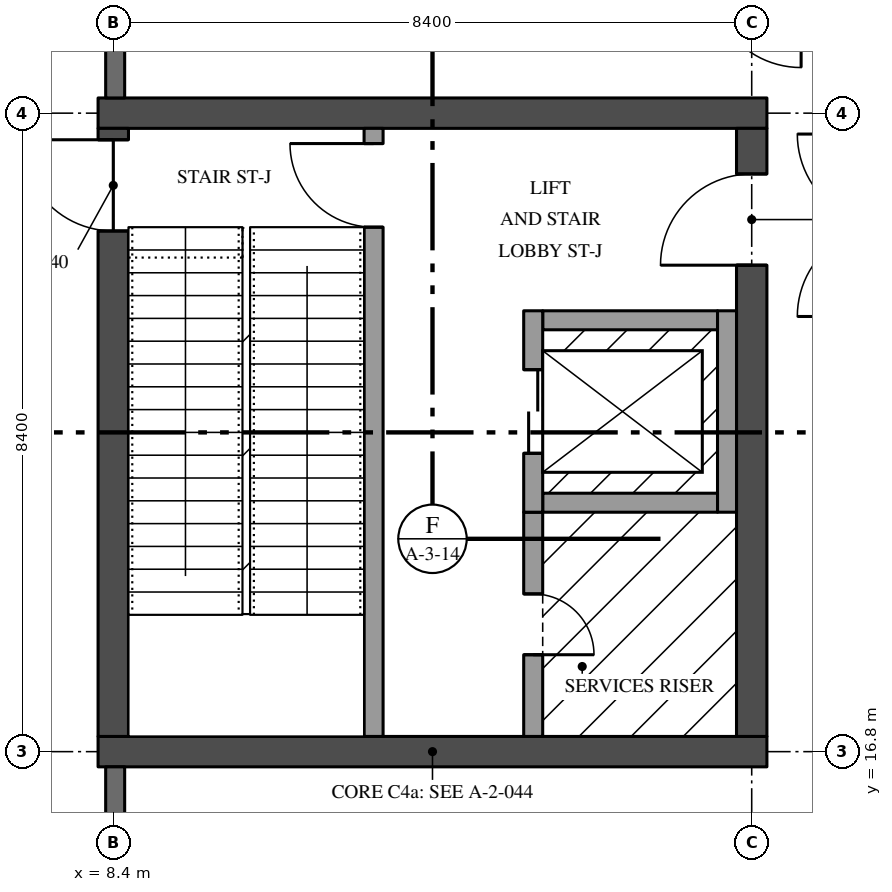
"""IFC4 building model, lengths in metres.
Left out: names, types, materials, properties, quantities, classifications, styles, units other than length and angle.
Written with IfcOpenShell. Run it as: python <this file> out.ifc"""

import sys

from ifc_helpers import new_model, si_unit, direction, frame, frame_2d, origin, place, context, subcontext, project, spatial, rectangle, extrude, element, fill, save


model = new_model("IFC4")
c1 = context("Model", 3, precision=1e-05, world=origin(), true_north=direction((0.0, 1.0)))
c2 = subcontext(c1, "Body", "Model", "MODEL_VIEW")
j1 = project(units=[si_unit("LENGTHUNIT", "METRE"), si_unit("PLANEANGLEUNIT", "RADIAN")], contexts=[c1])
p1 = place(None, origin())
s1 = spatial("IfcSite", under=j1, at=p1, CompositionType="ELEMENT")
p2 = place(p1, origin())
s2 = spatial("IfcBuilding", under=s1, at=p2, CompositionType="ELEMENT")
p3 = place(p2, origin())
s3 = spatial("IfcBuildingStorey", under=s2, at=p3, CompositionType="ELEMENT", Elevation=0.0)
for number, where, z_axis, x_axis in (
    (1, (8.2, 16.8, 0.0), (0.0, 0.0, 1.0), (1.0, 0.0, 0.0)),
    (2, (8.2, 25.2, 0.0), (0.0, 0.0, 1.0), (1.0, 0.0, 0.0)),
):
    element("IfcWall", number, at=place(p3, frame(where, z_axis=z_axis, x_axis=x_axis)), inside=s3, PredefinedType="SHEAR", context=c2, shape_type="SweptSolid", body=[
        extrude(rectangle(XDim=8.8, YDim=0.4, at=frame_2d((4.4, 0.0))), origin(), (0.0, 0.0, 1.0), 5.05),
    ])
p4 = place(p3, frame((8.4, 17.0, 0.0), z_axis=(0.0, 0.0, 1.0), x_axis=(0.0, 1.0, 0.0)))
e3 = element("IfcWall", 3, at=p4, inside=s3, PredefinedType="SHEAR", context=c2, shape_type="SweptSolid", body=[
    extrude(rectangle(XDim=8.0, YDim=0.4, at=frame_2d((4.0, 0.0))), origin(), (0.0, 0.0, 1.0), 5.05),
])
p5 = place(p4, frame((6.65, 0.0, 0.0)))
e4 = element("IfcOpeningElement", 4, at=p5, cuts=e3, PredefinedType="OPENING", context=c2, shape_type="SweptSolid", body=[
    extrude(rectangle(XDim=1.2, YDim=2.1, at=frame_2d((0.6, 1.05))), frame((0.0, 0.21, 0.0), z_axis=(0.0, -1.0, 0.0), x_axis=(1.0, 0.0, 0.0)), (0.0, 0.0, 1.0), 0.42),
])
p6 = place(p3, frame((16.8, 17.0, 0.0), z_axis=(0.0, 0.0, 1.0), x_axis=(0.0, 1.0, 0.0)))
e5 = element("IfcWall", 5, at=p6, inside=s3, PredefinedType="SHEAR", context=c2, shape_type="SweptSolid", body=[
    extrude(rectangle(XDim=8.0, YDim=0.4, at=frame_2d((4.0, 0.0))), origin(), (0.0, 0.0, 1.0), 5.05),
])
p7 = place(p6, frame((6.2, 0.0, 0.0)))
e6 = element("IfcOpeningElement", 6, at=p7, cuts=e5, PredefinedType="OPENING", context=c2, shape_type="SweptSolid", body=[
    extrude(rectangle(XDim=1.2, YDim=2.1, at=frame_2d((0.6, 1.05))), frame((0.0, 0.21, 0.0), z_axis=(0.0, -1.0, 0.0), x_axis=(1.0, 0.0, 0.0)), (0.0, 0.0, 1.0), 0.42),
])
p8 = place(p3, frame((11.825, 25.0, 0.0), z_axis=(0.0, 0.0, 1.0), x_axis=(0.0, -1.0, 0.0)))
e7 = element("IfcWall", 7, at=p8, inside=s3, PredefinedType="SOLIDWALL", context=c2, shape_type="SweptSolid", body=[
    extrude(rectangle(XDim=8.0, YDim=0.25, at=frame_2d((4.0, 0.0))), origin(), (0.0, 0.0, 1.0), 5.05),
])
p9 = place(p8, frame((0.2, 0.0, 0.0)))
e8 = element("IfcOpeningElement", 8, at=p9, cuts=e7, PredefinedType="OPENING", context=c2, shape_type="SweptSolid", body=[
    extrude(rectangle(XDim=1.1, YDim=2.1, at=frame_2d((0.55, 1.05))), frame((0.0, 0.135, 0.0), z_axis=(0.0, -1.0, 0.0), x_axis=(1.0, 0.0, 0.0)), (0.0, 0.0, 1.0), 0.27),
])
p10 = place(p3, frame((13.925, 19.95, 0.0), z_axis=(0.0, 0.0, 1.0), x_axis=(0.0, -1.0, 0.0)))
e9 = element("IfcWall", 9, at=p10, inside=s3, PredefinedType="SOLIDWALL", context=c2, shape_type="SweptSolid", body=[
    extrude(rectangle(XDim=2.95, YDim=0.25, at=frame_2d((1.475, 0.0))), origin(), (0.0, 0.0, 1.0), 5.05),
])
p11 = place(p10, frame((1.075, 0.0, 0.0)))
e10 = element("IfcOpeningElement", 10, at=p11, cuts=e9, PredefinedType="OPENING", context=c2, shape_type="SweptSolid", body=[
    extrude(rectangle(XDim=0.8, YDim=2.1, at=frame_2d((0.4, 1.05))), frame((0.0, 0.135, 0.0), z_axis=(0.0, -1.0, 0.0), x_axis=(1.0, 0.0, 0.0)), (0.0, 0.0, 1.0), 0.27),
])
p12 = place(p3, frame((16.475, 19.95, 0.0), z_axis=(0.0, 0.0, 1.0), x_axis=(0.0, 1.0, 0.0)))
e11 = element("IfcWall", 11, at=p12, inside=s3, PredefinedType="SOLIDWALL", context=c2, shape_type="SweptSolid", body=[
    extrude(rectangle(XDim=2.65, YDim=0.25, at=frame_2d((1.325, 0.0))), origin(), (0.0, 0.0, 1.0), 5.05),
])
for number, where, z_axis, x_axis in (
    (12, (14.05, 22.475, 0.0), (0.0, 0.0, 1.0), (1.0, 0.0, 0.0)),
    (13, (14.05, 20.075, 0.0), (0.0, 0.0, 1.0), (1.0, 0.0, 0.0)),
):
    element("IfcWall", number, at=place(p3, frame(where, z_axis=z_axis, x_axis=x_axis)), inside=s3, PredefinedType="SOLIDWALL", context=c2, shape_type="SweptSolid", body=[
        extrude(rectangle(XDim=2.3, YDim=0.25, at=frame_2d((1.15, 0.0))), origin(), (0.0, 0.0, 1.0), 5.05),
    ])
p13 = place(p3, frame((13.925, 19.95, 0.0), z_axis=(0.0, 0.0, 1.0), x_axis=(0.0, 1.0, 0.0)))
e14 = element("IfcWall", 14, at=p13, inside=s3, PredefinedType="SOLIDWALL", context=c2, shape_type="SweptSolid", body=[
    extrude(rectangle(XDim=2.65, YDim=0.25, at=frame_2d((1.325, 0.0))), origin(), (0.0, 0.0, 1.0), 5.05),
])
p14 = place(p13, frame((0.775, 0.0, 0.0)))
e15 = element("IfcOpeningElement", 15, at=p14, cuts=e14, PredefinedType="OPENING", context=c2, shape_type="SweptSolid", body=[
    extrude(rectangle(XDim=1.1, YDim=2.1, at=frame_2d((0.55, 1.05))), frame((0.0, 0.135, 0.0), z_axis=(0.0, -1.0, 0.0), x_axis=(1.0, 0.0, 0.0)), (0.0, 0.0, 1.0), 0.27),
])
p15 = place(p3, frame((8.425, 33.17, 0.0), z_axis=(0.0, 0.0, 1.0), x_axis=(0.0, -1.0, 0.0)))
e16 = element("IfcWall", 16, at=p15, inside=s3, PredefinedType="SOLIDWALL", context=c2, shape_type="SweptSolid", body=[
    extrude(rectangle(XDim=7.77, YDim=0.25, at=frame_2d((3.885, 0.0))), origin(), (0.0, 0.0, 1.0), 5.05),
])
p16 = place(p3, frame((8.425, 16.6, 0.0), z_axis=(0.0, 0.0, 1.0), x_axis=(0.0, -1.0, 0.0)))
e17 = element("IfcWall", 17, at=p16, inside=s3, PredefinedType="SOLIDWALL", context=c2, shape_type="SweptSolid", body=[
    extrude(rectangle(XDim=7.82, YDim=0.25, at=frame_2d((3.91, 0.0))), origin(), (0.0, 0.0, 1.0), 5.05),
])
p17 = place(p7, origin())
e18 = element("IfcDoor", 18, at=p17, inside=s3, OperationType="SINGLE_SWING_RIGHT", PredefinedType="DOOR", context=c2, shape_type="SweptSolid", body=[
    extrude(rectangle(XDim=1.2, YDim=2.1, at=frame_2d((0.6, 1.05))), frame((0.0, 0.035, 0.0), z_axis=(0.0, -1.0, 0.0), x_axis=(1.0, 0.0, 0.0)), (0.0, 0.0, 1.0), 0.07),
])
fill(e6, e18)
p18 = place(p11, origin())
e19 = element("IfcDoor", 19, at=p18, inside=s3, OperationType="SINGLE_SWING_LEFT", PredefinedType="DOOR", context=c2, shape_type="SweptSolid", body=[
    extrude(rectangle(XDim=0.8, YDim=2.1, at=frame_2d((0.4, 1.05))), frame((0.0, 0.035, 0.0), z_axis=(0.0, -1.0, 0.0), x_axis=(1.0, 0.0, 0.0)), (0.0, 0.0, 1.0), 0.07),
])
fill(e10, e19)
p19 = place(p9, frame((1.1, 0.0, 0.0), z_axis=(0.0, 0.0, 1.0), x_axis=(-1.0, 0.0, 0.0)))
e20 = element("IfcDoor", 20, at=p19, inside=s3, OperationType="SINGLE_SWING_LEFT", PredefinedType="DOOR", context=c2, shape_type="SweptSolid", body=[
    extrude(rectangle(XDim=1.1, YDim=2.1, at=frame_2d((0.55, 1.05))), frame((0.0, 0.035, 0.0), z_axis=(0.0, -1.0, 0.0), x_axis=(1.0, 0.0, 0.0)), (0.0, 0.0, 1.0), 0.07),
])
fill(e8, e20)
p20 = place(p5, origin())
e21 = element("IfcDoor", 21, at=p20, inside=s3, OperationType="SINGLE_SWING_LEFT", PredefinedType="DOOR", context=c2, shape_type="SweptSolid", body=[
    extrude(rectangle(XDim=1.2, YDim=2.1, at=frame_2d((0.6, 1.05))), frame((0.0, 0.035, 0.0), z_axis=(0.0, -1.0, 0.0), x_axis=(1.0, 0.0, 0.0)), (0.0, 0.0, 1.0), 0.07),
])
fill(e4, e21)
p21 = place(p14, origin())
e22 = element("IfcDoor", 22, at=p21, inside=s3, OperationType="DOUBLE_DOOR_SLIDING", PredefinedType="DOOR", context=c2, shape_type="SweptSolid", body=[
    extrude(rectangle(XDim=1.1, YDim=2.1, at=frame_2d((0.55, 1.05))), frame((0.0, 0.04, 0.0), z_axis=(0.0, -1.0, 0.0), x_axis=(1.0, 0.0, 0.0)), (0.0, 0.0, 1.0), 0.08),
])
fill(e15, e22)
save(model, sys.argv[1])
